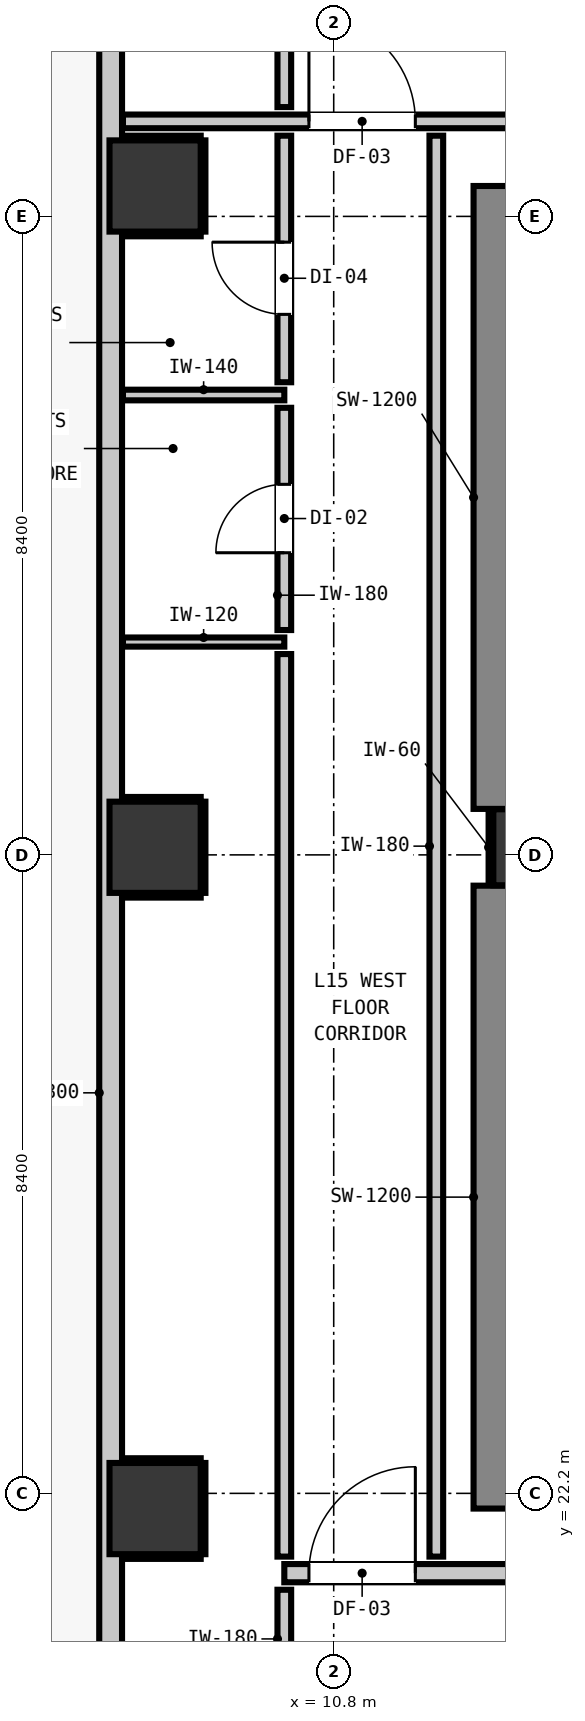
"""IFC4 building model, lengths in metres.
Left out: names, types, materials, properties, quantities, classifications, styles, units other than length and angle.
Written with IfcOpenShell. Run it as: python <this file> out.ifc"""

import sys

from ifc_helpers import new_model, si_unit, direction, frame, frame_2d, origin, origin_2d, place, context, subcontext, project, spatial, rectangle, extrude, element, fill, save


model = new_model("IFC4")
c1 = context("Model", 3, precision=1e-05, world=origin(), true_north=direction((0.0, 1.0)))
c2 = subcontext(c1, "Body", "Model", "MODEL_VIEW")
j1 = project(units=[si_unit("LENGTHUNIT", "METRE"), si_unit("PLANEANGLEUNIT", "RADIAN")], contexts=[c1])
p1 = place(None, origin())
s1 = spatial("IfcSite", under=j1, at=p1, CompositionType="ELEMENT")
p2 = place(p1, origin())
s2 = spatial("IfcBuilding", under=s1, at=p2, CompositionType="ELEMENT")
p3 = place(p2, frame((0.0, 0.0, 55.2)))
s3 = spatial("IfcBuildingStorey", under=s2, at=p3, CompositionType="ELEMENT", Elevation=55.2)
p4 = place(p3, frame((13.4, 30.7, 0.0), z_axis=(0.0, 0.0, 1.0), x_axis=(1.0, 0.0, 0.0)))
e1 = element("IfcColumn", 1, at=p4, inside=s3, PredefinedType="COLUMN", context=c2, shape_type="SweptSolid", body=[
    extrude(rectangle(XDim=1.0, YDim=1.0, at=origin_2d()), origin(), (0.0, 0.0, 1.0), 3.32),
])
p5 = place(p3, frame((13.24, 22.0, 0.0), z_axis=(0.0, 0.0, 1.0), x_axis=(0.0, 1.0, 0.0)))
e2 = element("IfcWall", 2, at=p5, inside=s3, PredefinedType="SHEAR", context=c2, shape_type="SweptSolid", body=[
    extrude(rectangle(XDim=8.195, YDim=1.2, at=frame_2d((4.098, 0.0))), origin(), (0.0, 0.0, 1.0), 3.32),
])
p6 = place(p3, frame((13.24, 31.205, 0.0), z_axis=(0.0, 0.0, 1.0), x_axis=(0.0, 1.0, 0.0)))
e3 = element("IfcWall", 3, at=p6, inside=s3, PredefinedType="SHEAR", context=c2, shape_type="SweptSolid", body=[
    extrude(rectangle(XDim=8.195, YDim=1.2, at=frame_2d((4.097, 0.0))), origin(), (0.0, 0.0, 1.0), 3.32),
])
for number, where, z_axis, x_axis in (
    (4, (8.45, 22.0, 0.0), (0.0, 0.0, 1.0), (1.0, 0.0, 0.0)),
    (5, (8.45, 30.7, 0.0), (0.0, 0.0, 1.0), (1.0, 0.0, 0.0)),
    (6, (8.45, 39.4, 0.0), (0.0, 0.0, 1.0), (1.0, 0.0, 0.0)),
):
    element("IfcColumn", number, at=place(p3, frame(where, z_axis=z_axis, x_axis=x_axis)), inside=s3, PredefinedType="COLUMN", context=c2, shape_type="SweptSolid", body=[
        extrude(rectangle(XDim=1.2, YDim=1.2, at=origin_2d()), origin(), (0.0, 0.0, 1.0), 3.32),
    ])
p7 = place(p3, frame((7.865, 10.165, 0.0), z_axis=(0.0, 0.0, 1.0), x_axis=(0.0, 1.0, 0.0)))
e7 = element("IfcWall", 7, at=p7, inside=s3, PredefinedType="STANDARD", context=c2, shape_type="SweptSolid", body=[
    extrude(rectangle(XDim=34.67, YDim=0.3, at=frame_2d((17.335, 0.0))), origin(), (0.0, 0.0, 1.0), 3.06),
])
p8 = place(p7, frame((0.901, 0.0, 0.0)))
e8 = element("IfcOpeningElement", 8, at=p8, cuts=e7, PredefinedType="OPENING", context=c2, shape_type="SweptSolid", body=[
    extrude(rectangle(XDim=1.0, YDim=2.15, at=frame_2d((0.5, 1.075))), frame((0.0, 0.16, 0.0), z_axis=(0.0, -1.0, 0.0), x_axis=(1.0, 0.0, 0.0)), (0.0, 0.0, 1.0), 0.32),
])
p9 = place(p7, frame((32.708, 0.0, 0.85)))
e9 = element("IfcOpeningElement", 9, at=p9, cuts=e7, PredefinedType="OPENING", context=c2, shape_type="SweptSolid", body=[
    extrude(rectangle(XDim=1.05, YDim=1.65, at=frame_2d((0.525, 0.825))), frame((0.0, 0.16, 0.0), z_axis=(0.0, -1.0, 0.0), x_axis=(1.0, 0.0, 0.0)), (0.0, 0.0, 1.0), 0.32),
])
p10 = place(p3, frame((10.15, 21.15, 0.0), z_axis=(0.0, 0.0, 1.0), x_axis=(1.0, 0.0, 0.0)))
e10 = element("IfcWall", 10, at=p10, inside=s3, PredefinedType="PARTITIONING", context=c2, shape_type="SweptSolid", body=[
    extrude(rectangle(XDim=40.023, YDim=0.24, at=frame_2d((20.012, 0.0))), origin(), (0.0, 0.0, 1.0), 3.06),
])
p11 = place(p10, frame((8.06, 0.0, 0.0)))
e11 = element("IfcOpeningElement", 11, at=p11, cuts=e10, PredefinedType="OPENING", context=c2, shape_type="SweptSolid", body=[
    extrude(rectangle(XDim=1.1, YDim=2.15, at=frame_2d((0.55, 1.075))), frame((0.0, 0.13, 0.0), z_axis=(0.0, -1.0, 0.0), x_axis=(1.0, 0.0, 0.0)), (0.0, 0.0, 1.0), 0.26),
])
p12 = place(p10, frame((0.324, 0.0, 0.0)))
e12 = element("IfcOpeningElement", 12, at=p12, cuts=e10, PredefinedType="OPENING", context=c2, shape_type="SweptSolid", body=[
    extrude(rectangle(XDim=1.4, YDim=2.15, at=frame_2d((0.7, 1.075))), frame((0.0, 0.13, 0.0), z_axis=(0.0, -1.0, 0.0), x_axis=(1.0, 0.0, 0.0)), (0.0, 0.0, 1.0), 0.26),
])
p13 = place(p10, frame((31.825, 0.0, 0.0)))
e13 = element("IfcOpeningElement", 13, at=p13, cuts=e10, PredefinedType="OPENING", context=c2, shape_type="SweptSolid", body=[
    extrude(rectangle(XDim=1.0, YDim=2.15, at=frame_2d((0.5, 1.075))), frame((0.0, 0.13, 0.0), z_axis=(0.0, -1.0, 0.0), x_axis=(1.0, 0.0, 0.0)), (0.0, 0.0, 1.0), 0.26),
])
p14 = place(p3, frame((8.027, 40.25, 0.0), z_axis=(0.0, 0.0, 1.0), x_axis=(1.0, 0.0, 0.0)))
e14 = element("IfcWall", 14, at=p14, inside=s3, PredefinedType="PARTITIONING", context=c2, shape_type="SweptSolid", body=[
    extrude(rectangle(XDim=28.905, YDim=0.18, at=frame_2d((14.452, 0.0))), origin(), (0.0, 0.0, 1.0), 3.06),
])
p15 = place(p14, frame((9.408, 0.0, 0.0)))
e15 = element("IfcOpeningElement", 15, at=p15, cuts=e14, PredefinedType="OPENING", context=c2, shape_type="SweptSolid", body=[
    extrude(rectangle(XDim=1.4, YDim=2.15, at=frame_2d((0.7, 1.075))), frame((0.0, 0.1, 0.0), z_axis=(0.0, -1.0, 0.0), x_axis=(1.0, 0.0, 0.0)), (0.0, 0.0, 1.0), 0.2),
])
p16 = place(p14, frame((2.447, 0.0, 0.0)))
e16 = element("IfcOpeningElement", 16, at=p16, cuts=e14, PredefinedType="OPENING", context=c2, shape_type="SweptSolid", body=[
    extrude(rectangle(XDim=1.4, YDim=2.15, at=frame_2d((0.7, 1.075))), frame((0.0, 0.1, 0.0), z_axis=(0.0, -1.0, 0.0), x_axis=(1.0, 0.0, 0.0)), (0.0, 0.0, 1.0), 0.2),
])
p17 = place(p3, frame((8.027, 36.65, 0.0), z_axis=(0.0, 0.0, 1.0), x_axis=(1.0, 0.0, 0.0)))
e17 = element("IfcWall", 17, at=p17, inside=s3, PredefinedType="PARTITIONING", context=c2, shape_type="SweptSolid", body=[
    extrude(rectangle(XDim=2.123, YDim=0.14, at=frame_2d((1.062, 0.0))), origin(), (0.0, 0.0, 1.0), 3.06),
])
p18 = place(p3, frame((8.027, 33.4, 0.0), z_axis=(0.0, 0.0, 1.0), x_axis=(1.0, 0.0, 0.0)))
e18 = element("IfcWall", 18, at=p18, inside=s3, PredefinedType="PARTITIONING", context=c2, shape_type="SweptSolid", body=[
    extrude(rectangle(XDim=2.123, YDim=0.12, at=frame_2d((1.062, 0.0))), origin(), (0.0, 0.0, 1.0), 3.06),
])
p19 = place(p3, frame((10.15, 19.638, 0.0), z_axis=(0.0, 0.0, 1.0), x_axis=(0.0, 1.0, 0.0)))
e19 = element("IfcWall", 19, at=p19, inside=s3, PredefinedType="PARTITIONING", context=c2, shape_type="SweptSolid", body=[
    extrude(rectangle(XDim=1.294, YDim=0.18, at=frame_2d((0.647, 0.0))), origin(), (0.0, 0.0, 1.0), 3.06),
])
p20 = place(p3, frame((10.15, 21.368, 0.0), z_axis=(0.0, 0.0, 1.0), x_axis=(0.0, 1.0, 0.0)))
e20 = element("IfcWall", 20, at=p20, inside=s3, PredefinedType="PARTITIONING", context=c2, shape_type="SweptSolid", body=[
    extrude(rectangle(XDim=11.874, YDim=0.18, at=frame_2d((5.937, 0.0))), origin(), (0.0, 0.0, 1.0), 3.06),
])
p21 = place(p3, frame((10.15, 33.558, 0.0), z_axis=(0.0, 0.0, 1.0), x_axis=(0.0, 1.0, 0.0)))
e21 = element("IfcWall", 21, at=p21, inside=s3, PredefinedType="PARTITIONING", context=c2, shape_type="SweptSolid", body=[
    extrude(rectangle(XDim=2.924, YDim=0.18, at=frame_2d((1.462, 0.0))), origin(), (0.0, 0.0, 1.0), 3.06),
])
p22 = place(p21, frame((1.017, 0.0, 0.0)))
e22 = element("IfcOpeningElement", 22, at=p22, cuts=e21, PredefinedType="OPENING", context=c2, shape_type="SweptSolid", body=[
    extrude(rectangle(XDim=0.9, YDim=2.1, at=frame_2d((0.45, 1.05))), frame((0.0, 0.1, 0.0), z_axis=(0.0, -1.0, 0.0), x_axis=(1.0, 0.0, 0.0)), (0.0, 0.0, 1.0), 0.2),
])
p23 = place(p3, frame((10.15, 36.818, 0.0), z_axis=(0.0, 0.0, 1.0), x_axis=(0.0, 1.0, 0.0)))
e23 = element("IfcWall", 23, at=p23, inside=s3, PredefinedType="PARTITIONING", context=c2, shape_type="SweptSolid", body=[
    extrude(rectangle(XDim=3.244, YDim=0.18, at=frame_2d((1.622, 0.0))), origin(), (0.0, 0.0, 1.0), 3.06),
])
p24 = place(p23, frame((0.893, 0.0, 0.0)))
e24 = element("IfcOpeningElement", 24, at=p24, cuts=e23, PredefinedType="OPENING", context=c2, shape_type="SweptSolid", body=[
    extrude(rectangle(XDim=0.95, YDim=2.1, at=frame_2d((0.475, 1.05))), frame((0.0, 0.1, 0.0), z_axis=(0.0, -1.0, 0.0), x_axis=(1.0, 0.0, 0.0)), (0.0, 0.0, 1.0), 0.2),
])
p25 = place(p3, frame((10.15, 40.438, 0.0), z_axis=(0.0, 0.0, 1.0), x_axis=(0.0, 1.0, 0.0)))
e25 = element("IfcWall", 25, at=p25, inside=s3, PredefinedType="PARTITIONING", context=c2, shape_type="SweptSolid", body=[
    extrude(rectangle(XDim=1.324, YDim=0.18, at=frame_2d((0.662, 0.0))), origin(), (0.0, 0.0, 1.0), 2.445),
])
p26 = place(p3, frame((12.15, 21.368, 0.0), z_axis=(0.0, 0.0, 1.0), x_axis=(0.0, 1.0, 0.0)))
e26 = element("IfcWall", 26, at=p26, inside=s3, PredefinedType="PARTITIONING", context=c2, shape_type="SweptSolid", body=[
    extrude(rectangle(XDim=18.694, YDim=0.18, at=frame_2d((9.347, 0.0))), origin(), (0.0, 0.0, 1.0), 3.06),
])
p27 = place(p3, frame((12.868, 30.21, 0.0), z_axis=(0.0, 0.0, 1.0), x_axis=(0.0, 1.0, 0.0)))
e27 = element("IfcWall", 27, at=p27, inside=s3, PredefinedType="PARTITIONING", context=c2, shape_type="SweptSolid", body=[
    extrude(rectangle(XDim=0.98, YDim=0.06, at=frame_2d((0.49, 0.0))), origin(), (0.0, 0.0, 1.0), 1.45),
])
for number, where, z_axis, x_axis in (
    (28, (8.03, 21.368, 0.0), (0.0, 0.0, 1.0), (1.0, 0.0, 0.0)),
    (29, (8.03, 22.632, 0.0), (0.0, 0.0, 1.0), (1.0, 0.0, 0.0)),
):
    element("IfcWall", number, at=place(p3, frame(where, z_axis=z_axis, x_axis=x_axis)), inside=s3, PredefinedType="PARTITIONING", context=c2, shape_type="SweptSolid", body=[
        extrude(rectangle(XDim=1.02, YDim=0.06, at=frame_2d((0.51, 0.0))), origin(), (0.0, 0.0, 1.0), 1.45),
    ])
p28 = place(p3, frame((9.082, 21.4, 0.0), z_axis=(0.0, 0.0, 1.0), x_axis=(0.0, 1.0, 0.0)))
e30 = element("IfcWall", 30, at=p28, inside=s3, PredefinedType="PARTITIONING", context=c2, shape_type="SweptSolid", body=[
    extrude(rectangle(XDim=1.2, YDim=0.06, at=frame_2d((0.6, 0.0))), origin(), (0.0, 0.0, 1.0), 1.45),
])
for number, where, z_axis, x_axis in (
    (31, (8.03, 30.068, 0.0), (0.0, 0.0, 1.0), (1.0, 0.0, 0.0)),
    (32, (8.03, 31.332, 0.0), (0.0, 0.0, 1.0), (1.0, 0.0, 0.0)),
):
    element("IfcWall", number, at=place(p3, frame(where, z_axis=z_axis, x_axis=x_axis)), inside=s3, PredefinedType="PARTITIONING", context=c2, shape_type="SweptSolid", body=[
        extrude(rectangle(XDim=1.02, YDim=0.06, at=frame_2d((0.51, 0.0))), origin(), (0.0, 0.0, 1.0), 1.45),
    ])
p29 = place(p3, frame((9.082, 30.1, 0.0), z_axis=(0.0, 0.0, 1.0), x_axis=(0.0, 1.0, 0.0)))
e33 = element("IfcWall", 33, at=p29, inside=s3, PredefinedType="PARTITIONING", context=c2, shape_type="SweptSolid", body=[
    extrude(rectangle(XDim=1.2, YDim=0.06, at=frame_2d((0.6, 0.0))), origin(), (0.0, 0.0, 1.0), 1.45),
])
for number, where, z_axis, x_axis in (
    (34, (8.03, 38.768, 0.0), (0.0, 0.0, 1.0), (1.0, 0.0, 0.0)),
    (35, (8.03, 40.032, 0.0), (0.0, 0.0, 1.0), (1.0, 0.0, 0.0)),
):
    element("IfcWall", number, at=place(p3, frame(where, z_axis=z_axis, x_axis=x_axis)), inside=s3, PredefinedType="PARTITIONING", context=c2, shape_type="SweptSolid", body=[
        extrude(rectangle(XDim=1.02, YDim=0.06, at=frame_2d((0.51, 0.0))), origin(), (0.0, 0.0, 1.0), 1.45),
    ])
p30 = place(p3, frame((9.082, 38.8, 0.0), z_axis=(0.0, 0.0, 1.0), x_axis=(0.0, 1.0, 0.0)))
e36 = element("IfcWall", 36, at=p30, inside=s3, PredefinedType="PARTITIONING", context=c2, shape_type="SweptSolid", body=[
    extrude(rectangle(XDim=1.2, YDim=0.06, at=frame_2d((0.6, 0.0))), origin(), (0.0, 0.0, 1.0), 1.45),
])
p31 = place(p12, origin())
e37 = element("IfcDoor", 37, at=p31, inside=s3, OperationType="SINGLE_SWING_RIGHT", PredefinedType="DOOR", context=c2, shape_type="SweptSolid", body=[
    extrude(rectangle(XDim=1.4, YDim=2.15, at=frame_2d((0.7, 1.075))), frame((0.0, 0.025, 0.0), z_axis=(0.0, -1.0, 0.0), x_axis=(1.0, 0.0, 0.0)), (0.0, 0.0, 1.0), 0.05),
])
fill(e12, e37)
p32 = place(p16, origin())
e38 = element("IfcDoor", 38, at=p32, inside=s3, OperationType="SINGLE_SWING_LEFT", PredefinedType="DOOR", context=c2, shape_type="SweptSolid", body=[
    extrude(rectangle(XDim=1.4, YDim=2.15, at=frame_2d((0.7, 1.075))), frame((0.0, 0.025, 0.0), z_axis=(0.0, -1.0, 0.0), x_axis=(1.0, 0.0, 0.0)), (0.0, 0.0, 1.0), 0.05),
])
fill(e16, e38)
p33 = place(p22, origin())
e39 = element("IfcDoor", 39, at=p33, inside=s3, OperationType="SINGLE_SWING_LEFT", PredefinedType="DOOR", context=c2, shape_type="SweptSolid", body=[
    extrude(rectangle(XDim=0.9, YDim=2.1, at=frame_2d((0.45, 1.05))), frame((0.0, 0.025, 0.0), z_axis=(0.0, -1.0, 0.0), x_axis=(1.0, 0.0, 0.0)), (0.0, 0.0, 1.0), 0.05),
])
fill(e22, e39)
p34 = place(p24, origin())
e40 = element("IfcDoor", 40, at=p34, inside=s3, OperationType="SINGLE_SWING_RIGHT", PredefinedType="DOOR", context=c2, shape_type="SweptSolid", body=[
    extrude(rectangle(XDim=0.95, YDim=2.1, at=frame_2d((0.475, 1.05))), frame((0.0, 0.025, 0.0), z_axis=(0.0, -1.0, 0.0), x_axis=(1.0, 0.0, 0.0)), (0.0, 0.0, 1.0), 0.05),
])
fill(e24, e40)
save(model, sys.argv[1])
